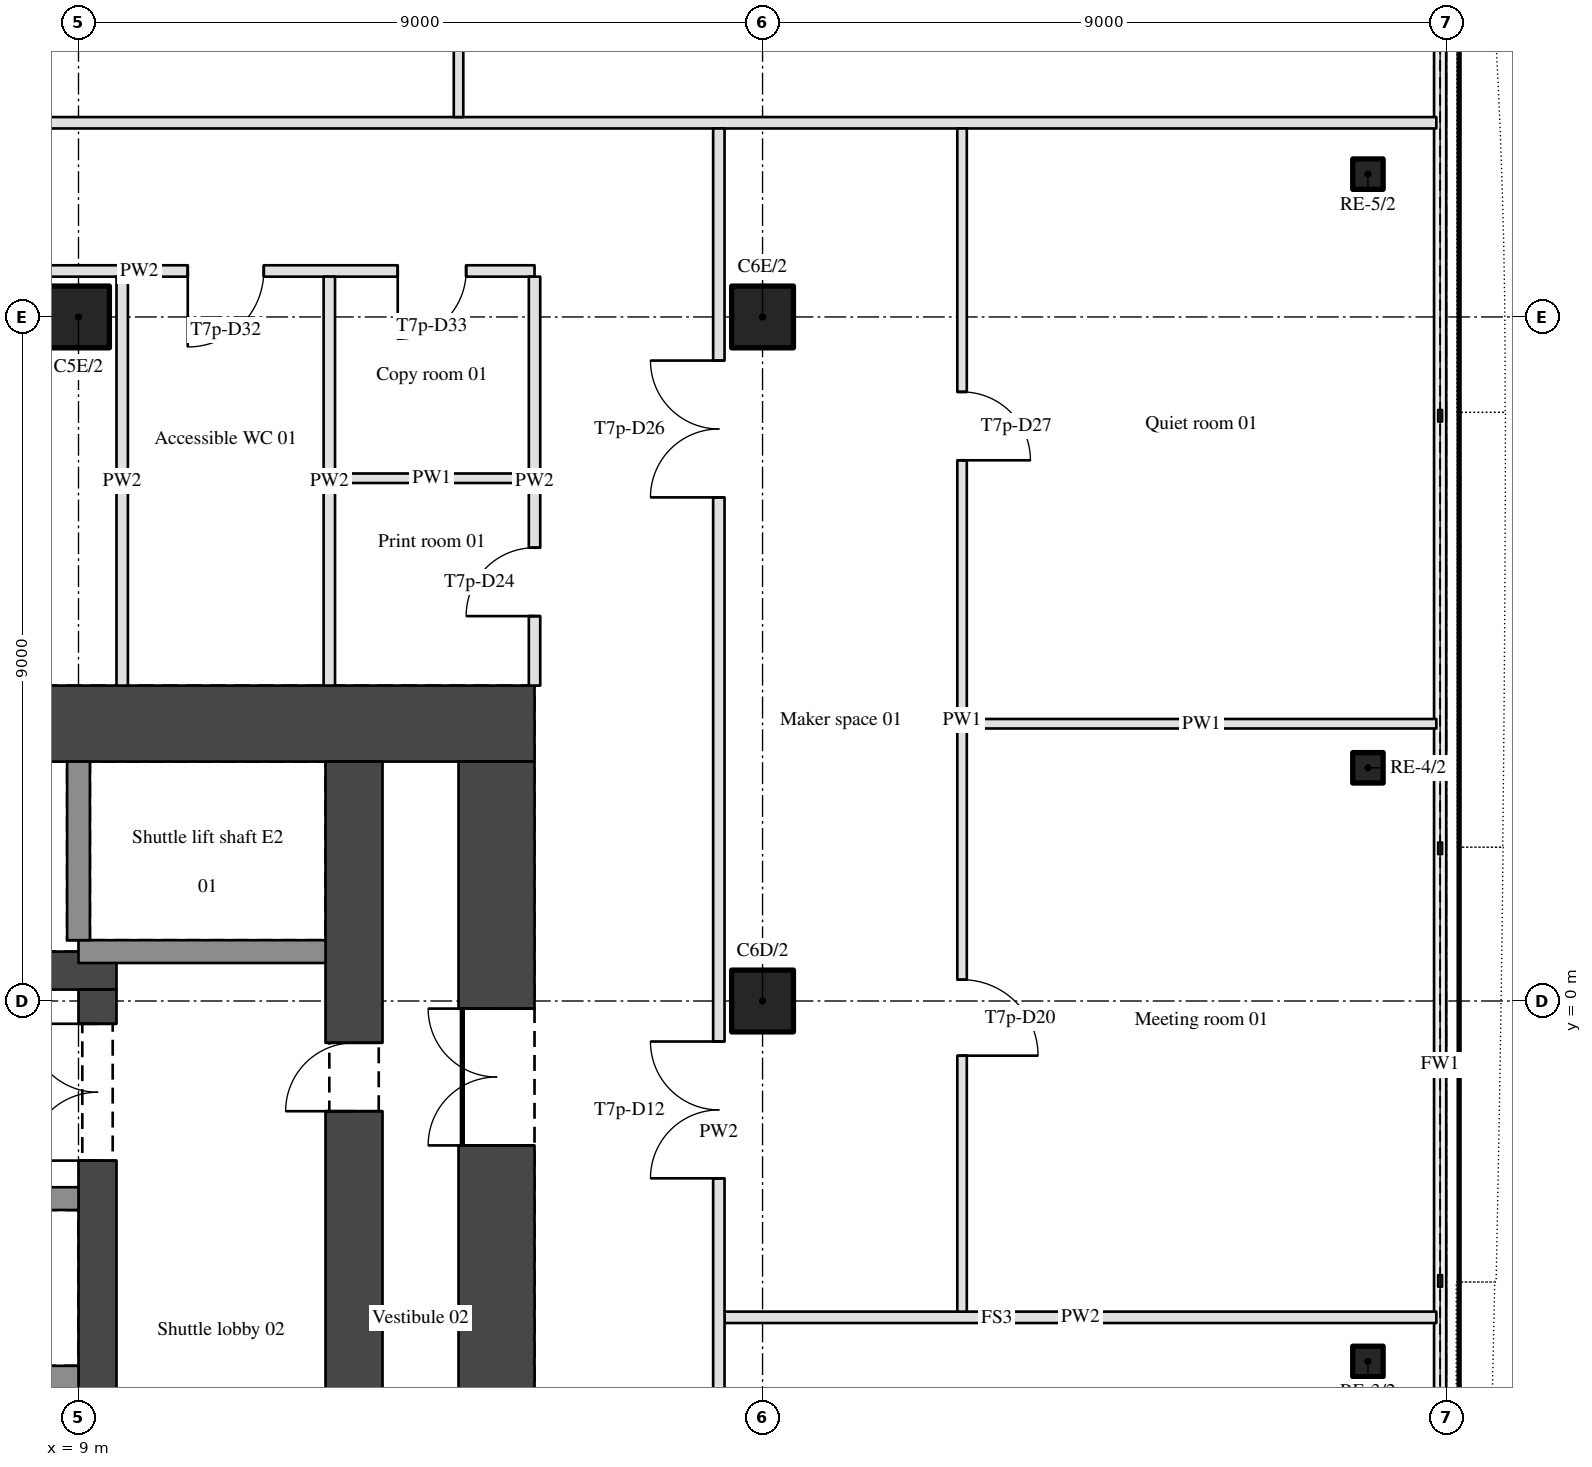
"""IFC4 building model, lengths in metres.
Left out: names, types, materials, properties, quantities, classifications, styles, units other than length and angle.
Written with IfcOpenShell. Run it as: python <this file> out.ifc"""

import sys

from ifc_helpers import new_model, si_unit, direction, frame, frame_2d, origin, origin_2d, place, context, subcontext, project, spatial, rectangle, hollow_rectangle, hollow_circle, extrude, element, fill, save


model = new_model("IFC4")
c1 = context("Model", 3, precision=1e-05, world=origin(), true_north=direction((0.0, 1.0)))
c2 = subcontext(c1, "Body", "Model", "MODEL_VIEW")
j1 = project(units=[si_unit("LENGTHUNIT", "METRE"), si_unit("PLANEANGLEUNIT", "RADIAN")], contexts=[c1])
p1 = place(None, origin())
s1 = spatial("IfcSite", under=j1, at=p1, CompositionType="ELEMENT")
p2 = place(p1, origin())
s2 = spatial("IfcBuilding", under=s1, at=p2, CompositionType="ELEMENT")
p3 = place(p2, frame((0.0, 0.0, 105.0)))
s3 = spatial("IfcBuildingStorey", under=s2, at=p3, CompositionType="ELEMENT", Elevation=105.0)
for number, where, z_axis, x_axis in (
    (1, (9.0, 9.0, 0.0), (0.0, 0.0, 1.0), (1.0, 0.0, 0.0)),
    (2, (18.0, 0.0, 0.0), (0.0, 0.0, 1.0), (1.0, 0.0, 0.0)),
    (3, (18.0, 9.0, 0.0), (0.0, 0.0, 1.0), (1.0, 0.0, 0.0)),
):
    element("IfcColumn", number, at=place(p3, frame(where, z_axis=z_axis, x_axis=x_axis)), inside=s3, PredefinedType="COLUMN", context=c2, shape_type="SweptSolid", body=[
        extrude(hollow_circle(Radius=0.406, WallThickness=0.036, at=origin_2d()), origin(), (0.0, 0.0, 1.0), 3.9),
    ])
for number, where, z_axis, x_axis in (
    (4, (25.965, -4.742, 0.0), (0.0, 0.0, 1.0), (1.0, 0.0, 0.0)),
    (5, (25.965, 3.068, 0.0), (0.0, 0.0, 1.0), (1.0, 0.0, 0.0)),
    (6, (25.965, 10.879, 0.0), (0.0, 0.0, 1.0), (1.0, 0.0, 0.0)),
):
    element("IfcColumn", number, at=place(p3, frame(where, z_axis=z_axis, x_axis=x_axis)), inside=s3, PredefinedType="COLUMN", context=c2, shape_type="SweptSolid", body=[
        extrude(hollow_rectangle(XDim=0.4, YDim=0.4, WallThickness=0.025, InnerFilletRadius=0.038, OuterFilletRadius=0.062, at=origin_2d()), origin(), (0.0, 0.0, 1.0), 3.9),
    ])
p4 = place(p3, frame((-15.0, 3.65, 0.0), z_axis=(0.0, 0.0, 1.0), x_axis=(1.0, 0.0, 0.0)))
e7 = element("IfcWall", 7, at=p4, inside=s3, PredefinedType="SHEAR", context=c2, shape_type="SweptSolid", body=[
    extrude(rectangle(XDim=30.0, YDim=1.0, at=frame_2d((15.0, 0.0))), origin(), (0.0, 0.0, 1.0), 3.9),
])
p5 = place(p3, frame((14.5, -11.5, 0.0), z_axis=(0.0, 0.0, 1.0), x_axis=(0.0, 1.0, 0.0)))
e8 = element("IfcWall", 8, at=p5, inside=s3, PredefinedType="SHEAR", context=c2, shape_type="SweptSolid", body=[
    extrude(rectangle(XDim=14.65, YDim=1.0, at=frame_2d((7.325, 0.0))), origin(), (0.0, 0.0, 1.0), 3.9),
])
p6 = place(p5, frame((9.6, 0.0, 0.0)))
e9 = element("IfcOpeningElement", 9, at=p6, cuts=e8, PredefinedType="OPENING", context=c2, shape_type="SweptSolid", body=[
    extrude(rectangle(XDim=1.8, YDim=2.1, at=frame_2d((0.9, 1.05))), frame((0.0, 0.51, 0.0), z_axis=(0.0, -1.0, 0.0), x_axis=(1.0, 0.0, 0.0)), (0.0, 0.0, 1.0), 1.02),
])
p7 = place(p3, frame((12.625, -11.5, 0.0), z_axis=(0.0, 0.0, 1.0), x_axis=(0.0, 1.0, 0.0)))
e10 = element("IfcWall", 10, at=p7, inside=s3, PredefinedType="SHEAR", context=c2, shape_type="SweptSolid", body=[
    extrude(rectangle(XDim=14.65, YDim=0.75, at=frame_2d((7.325, 0.0))), origin(), (0.0, 0.0, 1.0), 3.9),
])
p8 = place(p7, frame((10.05, 0.0, 0.0)))
e11 = element("IfcOpeningElement", 11, at=p8, cuts=e10, PredefinedType="OPENING", context=c2, shape_type="SweptSolid", body=[
    extrude(rectangle(XDim=0.9, YDim=2.1, at=frame_2d((0.45, 1.05))), frame((0.0, 0.385, 0.0), z_axis=(0.0, -1.0, 0.0), x_axis=(1.0, 0.0, 0.0)), (0.0, 0.0, 1.0), 0.77),
])
p9 = place(p3, frame((-9.5, 0.4, 0.0), z_axis=(0.0, 0.0, 1.0), x_axis=(1.0, 0.0, 0.0)))
e12 = element("IfcWall", 12, at=p9, inside=s3, PredefinedType="SHEAR", context=c2, shape_type="SweptSolid", body=[
    extrude(rectangle(XDim=19.0, YDim=0.5, at=frame_2d((9.5, 0.0))), origin(), (0.0, 0.0, 1.0), 3.9),
])
p10 = place(p3, frame((9.25, -11.5, 0.0), z_axis=(0.0, 0.0, 1.0), x_axis=(0.0, 1.0, 0.0)))
e13 = element("IfcWall", 13, at=p10, inside=s3, PredefinedType="SHEAR", context=c2, shape_type="SweptSolid", body=[
    extrude(rectangle(XDim=11.65, YDim=0.5, at=frame_2d((5.825, 0.0))), origin(), (0.0, 0.0, 1.0), 3.9),
])
p11 = place(p10, frame((9.4, 0.0, 0.0)))
e14 = element("IfcOpeningElement", 14, at=p11, cuts=e13, PredefinedType="OPENING", context=c2, shape_type="SweptSolid", body=[
    extrude(rectangle(XDim=1.8, YDim=2.1, at=frame_2d((0.9, 1.05))), frame((0.0, 0.26, 0.0), z_axis=(0.0, -1.0, 0.0), x_axis=(1.0, 0.0, 0.0)), (0.0, 0.0, 1.0), 0.52),
])
p12 = place(p10, frame((5.25, 0.0, 0.0)))
e15 = element("IfcOpeningElement", 15, at=p12, cuts=e13, PredefinedType="OPENING", context=c2, shape_type="SweptSolid", body=[
    extrude(rectangle(XDim=1.1, YDim=2.1, at=frame_2d((0.55, 1.05))), frame((0.0, 0.26, 0.0), z_axis=(0.0, -1.0, 0.0), x_axis=(1.0, 0.0, 0.0)), (0.0, 0.0, 1.0), 0.52),
])
p13 = place(p3, frame((0.9, -4.95, 0.0), z_axis=(0.0, 0.0, 1.0), x_axis=(1.0, 0.0, 0.0)))
e16 = element("IfcWall", 16, at=p13, inside=s3, PredefinedType="SHEAR", context=c2, shape_type="SweptSolid", body=[
    extrude(rectangle(XDim=8.1, YDim=0.3, at=frame_2d((4.05, 0.0))), origin(), (0.0, 0.0, 1.0), 3.9),
])
p14 = place(p3, frame((17.5, -4.162, 0.0), z_axis=(0.0, 0.0, 1.0), x_axis=(1.0, 0.0, 0.0)))
e17 = element("IfcWall", 17, at=p14, inside=s3, PredefinedType="PARTITIONING", context=c2, shape_type="SweptSolid", body=[
    extrude(rectangle(XDim=9.365, YDim=0.15, at=frame_2d((4.683, 0.0))), origin(), (0.0, 0.0, 1.0), 2.96),
])
p15 = place(p3, frame((0.9, -2.6, 0.0), z_axis=(0.0, 0.0, 1.0), x_axis=(1.0, 0.0, 0.0)))
e18 = element("IfcWall", 18, at=p15, inside=s3, PredefinedType="SHEAR", context=c2, shape_type="SweptSolid", body=[
    extrude(rectangle(XDim=8.1, YDim=0.3, at=frame_2d((4.05, 0.0))), origin(), (0.0, 0.0, 1.0), 3.9),
])
p16 = place(p15, frame((0.8, 0.0, 0.0)))
e19 = element("IfcOpeningElement", 19, at=p16, cuts=e18, PredefinedType="OPENING", context=c2, shape_type="SweptSolid", body=[
    extrude(rectangle(XDim=1.1, YDim=2.1, at=frame_2d((0.55, 1.05))), frame((0.0, 0.16, 0.0), z_axis=(0.0, -1.0, 0.0), x_axis=(1.0, 0.0, 0.0)), (0.0, 0.0, 1.0), 0.32),
])
p17 = place(p15, frame((3.5, 0.0, 0.0)))
e20 = element("IfcOpeningElement", 20, at=p17, cuts=e18, PredefinedType="OPENING", context=c2, shape_type="SweptSolid", body=[
    extrude(rectangle(XDim=1.1, YDim=2.1, at=frame_2d((0.55, 1.05))), frame((0.0, 0.16, 0.0), z_axis=(0.0, -1.0, 0.0), x_axis=(1.0, 0.0, 0.0)), (0.0, 0.0, 1.0), 0.32),
])
p18 = place(p15, frame((6.2, 0.0, 0.0)))
e21 = element("IfcOpeningElement", 21, at=p18, cuts=e18, PredefinedType="OPENING", context=c2, shape_type="SweptSolid", body=[
    extrude(rectangle(XDim=1.1, YDim=2.1, at=frame_2d((0.55, 1.05))), frame((0.0, 0.16, 0.0), z_axis=(0.0, -1.0, 0.0), x_axis=(1.0, 0.0, 0.0)), (0.0, 0.0, 1.0), 0.32),
])
p19 = place(p3, frame((12.25, 0.65, 0.0), z_axis=(0.0, 0.0, 1.0), x_axis=(-1.0, 0.0, 0.0)))
e22 = element("IfcWall", 22, at=p19, inside=s3, PredefinedType="SHEAR", context=c2, shape_type="SweptSolid", body=[
    extrude(rectangle(XDim=3.25, YDim=0.3, at=frame_2d((1.625, 0.0))), origin(), (0.0, 0.0, 1.0), 3.9),
])
p20 = place(p3, frame((20.688, 3.648, 0.0), z_axis=(0.0, 0.0, 1.0), x_axis=(1.0, 0.0, 0.0)))
e23 = element("IfcWall", 23, at=p20, inside=s3, PredefinedType="PARTITIONING", context=c2, shape_type="SweptSolid", body=[
    extrude(rectangle(XDim=6.177, YDim=0.125, at=frame_2d((3.089, 0.0))), origin(), (0.0, 0.0, 1.0), 2.96),
])
p21 = place(p3, frame((12.375, 6.878, 0.0), z_axis=(0.0, 0.0, 1.0), x_axis=(1.0, 0.0, 0.0)))
e24 = element("IfcWall", 24, at=p21, inside=s3, PredefinedType="PARTITIONING", context=c2, shape_type="SweptSolid", body=[
    extrude(rectangle(XDim=2.55, YDim=0.125, at=frame_2d((1.275, 0.0))), origin(), (0.0, 0.0, 1.0), 2.96),
])
p22 = place(p3, frame((15.0, 9.605, 0.0), z_axis=(0.0, 0.0, 1.0), x_axis=(-1.0, 0.0, 0.0)))
e25 = element("IfcWall", 25, at=p22, inside=s3, PredefinedType="PARTITIONING", context=c2, shape_type="SweptSolid", body=[
    extrude(rectangle(XDim=10.4, YDim=0.15, at=frame_2d((5.2, 0.0))), origin(), (0.0, 0.0, 1.0), 2.96),
])
p23 = place(p22, frame((0.9, 0.0, 0.0)))
e26 = element("IfcOpeningElement", 26, at=p23, cuts=e25, PredefinedType="OPENING", context=c2, shape_type="SweptSolid", body=[
    extrude(rectangle(XDim=0.9, YDim=2.1, at=frame_2d((0.45, 1.05))), frame((0.0, 0.085, 0.0), z_axis=(0.0, -1.0, 0.0), x_axis=(1.0, 0.0, 0.0)), (0.0, 0.0, 1.0), 0.17),
])
p24 = place(p22, frame((7.462, 0.0, 0.0)))
e27 = element("IfcOpeningElement", 27, at=p24, cuts=e25, PredefinedType="OPENING", context=c2, shape_type="SweptSolid", body=[
    extrude(rectangle(XDim=0.9, YDim=2.1, at=frame_2d((0.45, 1.05))), frame((0.0, 0.085, 0.0), z_axis=(0.0, -1.0, 0.0), x_axis=(1.0, 0.0, 0.0)), (0.0, 0.0, 1.0), 0.17),
])
p25 = place(p22, frame((3.562, 0.0, 0.0)))
e28 = element("IfcOpeningElement", 28, at=p25, cuts=e25, PredefinedType="OPENING", context=c2, shape_type="SweptSolid", body=[
    extrude(rectangle(XDim=1.0, YDim=2.1, at=frame_2d((0.5, 1.05))), frame((0.0, 0.085, 0.0), z_axis=(0.0, -1.0, 0.0), x_axis=(1.0, 0.0, 0.0)), (0.0, 0.0, 1.0), 0.17),
])
p26 = place(p3, frame((26.865, 11.555, 0.0), z_axis=(0.0, 0.0, 1.0), x_axis=(-1.0, 0.0, 0.0)))
e29 = element("IfcWall", 29, at=p26, inside=s3, PredefinedType="PARTITIONING", context=c2, shape_type="SweptSolid", body=[
    extrude(rectangle(XDim=47.73, YDim=0.15, at=frame_2d((23.865, 0.0))), origin(), (0.0, 0.0, 1.0), 2.96),
])
p27 = place(p26, frame((41.015, 0.0, 0.0)))
e30 = element("IfcOpeningElement", 30, at=p27, cuts=e29, PredefinedType="OPENING", context=c2, shape_type="SweptSolid", body=[
    extrude(rectangle(XDim=1.8, YDim=2.1, at=frame_2d((0.9, 1.05))), frame((0.0, 0.085, 0.0), z_axis=(0.0, -1.0, 0.0), x_axis=(1.0, 0.0, 0.0)), (0.0, 0.0, 1.0), 0.17),
])
p28 = place(p26, frame((21.015, 0.0, 0.0)))
e31 = element("IfcOpeningElement", 31, at=p28, cuts=e29, PredefinedType="OPENING", context=c2, shape_type="SweptSolid", body=[
    extrude(rectangle(XDim=1.8, YDim=2.1, at=frame_2d((0.9, 1.05))), frame((0.0, 0.085, 0.0), z_axis=(0.0, -1.0, 0.0), x_axis=(1.0, 0.0, 0.0)), (0.0, 0.0, 1.0), 0.17),
])
p29 = place(p3, frame((9.0, 0.8, 0.0), z_axis=(0.0, 0.0, 1.0), x_axis=(0.0, 1.0, 0.0)))
e32 = element("IfcWall", 32, at=p29, inside=s3, PredefinedType="SHEAR", context=c2, shape_type="SweptSolid", body=[
    extrude(rectangle(XDim=2.35, YDim=0.3, at=frame_2d((1.175, 0.0))), origin(), (0.0, 0.0, 1.0), 3.9),
])
for number, where, z_axis, x_axis in (
    (33, (9.575, 4.15, 0.0), (0.0, 0.0, 1.0), (0.0, 1.0, 0.0)),
    (34, (12.3, 4.15, 0.0), (0.0, 0.0, 1.0), (0.0, 1.0, 0.0)),
):
    element("IfcWall", number, at=place(p3, frame(where, z_axis=z_axis, x_axis=x_axis)), inside=s3, PredefinedType="PARTITIONING", context=c2, shape_type="SweptSolid", body=[
        extrude(rectangle(XDim=5.38, YDim=0.15, at=frame_2d((2.69, 0.0))), origin(), (0.0, 0.0, 1.0), 2.96),
    ])
p30 = place(p3, frame((14.0, 11.63, 0.0), z_axis=(0.0, 0.0, 1.0), x_axis=(0.0, 1.0, 0.0)))
e35 = element("IfcWall", 35, at=p30, inside=s3, PredefinedType="PARTITIONING", context=c2, shape_type="SweptSolid", body=[
    extrude(rectangle(XDim=4.263, YDim=0.125, at=frame_2d((2.131, 0.0))), origin(), (0.0, 0.0, 1.0), 2.96),
])
p31 = place(p3, frame((15.0, 4.15, 0.0), z_axis=(0.0, 0.0, 1.0), x_axis=(0.0, 1.0, 0.0)))
e36 = element("IfcWall", 36, at=p31, inside=s3, PredefinedType="PARTITIONING", context=c2, shape_type="SweptSolid", body=[
    extrude(rectangle(XDim=5.38, YDim=0.15, at=frame_2d((2.69, 0.0))), origin(), (0.0, 0.0, 1.0), 2.96),
])
p32 = place(p31, frame((0.914, 0.0, 0.0)))
e37 = element("IfcOpeningElement", 37, at=p32, cuts=e36, PredefinedType="OPENING", context=c2, shape_type="SweptSolid", body=[
    extrude(rectangle(XDim=0.9, YDim=2.1, at=frame_2d((0.45, 1.05))), frame((0.0, 0.085, 0.0), z_axis=(0.0, -1.0, 0.0), x_axis=(1.0, 0.0, 0.0)), (0.0, 0.0, 1.0), 0.17),
])
p33 = place(p3, frame((17.425, -14.925, 0.0), z_axis=(0.0, 0.0, 1.0), x_axis=(0.0, 1.0, 0.0)))
e38 = element("IfcWall", 38, at=p33, inside=s3, PredefinedType="PARTITIONING", context=c2, shape_type="SweptSolid", body=[
    extrude(rectangle(XDim=26.405, YDim=0.15, at=frame_2d((13.203, 0.0))), origin(), (0.0, 0.0, 1.0), 2.96),
])
p34 = place(p33, frame((0.312, 0.0, 0.0)))
e39 = element("IfcOpeningElement", 39, at=p34, cuts=e38, PredefinedType="OPENING", context=c2, shape_type="SweptSolid", body=[
    extrude(rectangle(XDim=1.8, YDim=2.1, at=frame_2d((0.9, 1.05))), frame((0.0, 0.085, 0.0), z_axis=(0.0, -1.0, 0.0), x_axis=(1.0, 0.0, 0.0)), (0.0, 0.0, 1.0), 0.17),
])
p35 = place(p33, frame((12.592, 0.0, 0.0)))
e40 = element("IfcOpeningElement", 40, at=p35, cuts=e38, PredefinedType="OPENING", context=c2, shape_type="SweptSolid", body=[
    extrude(rectangle(XDim=1.8, YDim=2.1, at=frame_2d((0.9, 1.05))), frame((0.0, 0.085, 0.0), z_axis=(0.0, -1.0, 0.0), x_axis=(1.0, 0.0, 0.0)), (0.0, 0.0, 1.0), 0.17),
])
p36 = place(p33, frame((21.551, 0.0, 0.0)))
e41 = element("IfcOpeningElement", 41, at=p36, cuts=e38, PredefinedType="OPENING", context=c2, shape_type="SweptSolid", body=[
    extrude(rectangle(XDim=1.8, YDim=2.1, at=frame_2d((0.9, 1.05))), frame((0.0, 0.085, 0.0), z_axis=(0.0, -1.0, 0.0), x_axis=(1.0, 0.0, 0.0)), (0.0, 0.0, 1.0), 0.17),
])
p37 = place(p3, frame((20.625, 11.48, 0.0), z_axis=(0.0, 0.0, 1.0), x_axis=(0.0, -1.0, 0.0)))
e42 = element("IfcWall", 42, at=p37, inside=s3, PredefinedType="PARTITIONING", context=c2, shape_type="SweptSolid", body=[
    extrude(rectangle(XDim=15.567, YDim=0.125, at=frame_2d((7.783, 0.0))), origin(), (0.0, 0.0, 1.0), 2.96),
])
p38 = place(p37, frame((11.199, 0.0, 0.0)))
e43 = element("IfcOpeningElement", 43, at=p38, cuts=e42, PredefinedType="OPENING", context=c2, shape_type="SweptSolid", body=[
    extrude(rectangle(XDim=1.0, YDim=2.1, at=frame_2d((0.5, 1.05))), frame((0.0, 0.073, 0.0), z_axis=(0.0, -1.0, 0.0), x_axis=(1.0, 0.0, 0.0)), (0.0, 0.0, 1.0), 0.145),
])
p39 = place(p37, frame((3.466, 0.0, 0.0)))
e44 = element("IfcOpeningElement", 44, at=p39, cuts=e42, PredefinedType="OPENING", context=c2, shape_type="SweptSolid", body=[
    extrude(rectangle(XDim=0.9, YDim=2.1, at=frame_2d((0.45, 1.05))), frame((0.0, 0.073, 0.0), z_axis=(0.0, -1.0, 0.0), x_axis=(1.0, 0.0, 0.0)), (0.0, 0.0, 1.0), 0.145),
])
p40 = place(p35, origin())
e45 = element("IfcDoor", 45, at=p40, inside=s3, OperationType="DOUBLE_DOOR_SINGLE_SWING", PredefinedType="DOOR", context=c2, shape_type="SweptSolid", body=[
    extrude(rectangle(XDim=1.8, YDim=2.1, at=frame_2d((0.9, 1.05))), frame((0.0, 0.025, 0.0), z_axis=(0.0, -1.0, 0.0), x_axis=(1.0, 0.0, 0.0)), (0.0, 0.0, 1.0), 0.05),
])
fill(e40, e45)
p41 = place(p36, origin())
e46 = element("IfcDoor", 46, at=p41, inside=s3, OperationType="DOUBLE_DOOR_SINGLE_SWING", PredefinedType="DOOR", context=c2, shape_type="SweptSolid", body=[
    extrude(rectangle(XDim=1.8, YDim=2.1, at=frame_2d((0.9, 1.05))), frame((0.0, 0.025, 0.0), z_axis=(0.0, -1.0, 0.0), x_axis=(1.0, 0.0, 0.0)), (0.0, 0.0, 1.0), 0.05),
])
fill(e41, e46)
p42 = place(p6, origin())
e47 = element("IfcDoor", 47, at=p42, inside=s3, OperationType="DOUBLE_DOOR_SINGLE_SWING", PredefinedType="DOOR", context=c2, shape_type="SweptSolid", body=[
    extrude(rectangle(XDim=1.8, YDim=2.1, at=frame_2d((0.9, 1.05))), frame((0.0, 0.025, 0.0), z_axis=(0.0, -1.0, 0.0), x_axis=(1.0, 0.0, 0.0)), (0.0, 0.0, 1.0), 0.05),
])
fill(e9, e47)
p43 = place(p11, origin())
e48 = element("IfcDoor", 48, at=p43, inside=s3, OperationType="DOUBLE_DOOR_SINGLE_SWING", PredefinedType="DOOR", context=c2, shape_type="SweptSolid", body=[
    extrude(rectangle(XDim=1.8, YDim=2.1, at=frame_2d((0.9, 1.05))), frame((0.0, 0.025, 0.0), z_axis=(0.0, -1.0, 0.0), x_axis=(1.0, 0.0, 0.0)), (0.0, 0.0, 1.0), 0.05),
])
fill(e14, e48)
p44 = place(p32, origin())
e49 = element("IfcDoor", 49, at=p44, inside=s3, OperationType="SINGLE_SWING_LEFT", PredefinedType="DOOR", context=c2, shape_type="SweptSolid", body=[
    extrude(rectangle(XDim=0.9, YDim=2.1, at=frame_2d((0.45, 1.05))), frame((0.0, 0.025, 0.0), z_axis=(0.0, -1.0, 0.0), x_axis=(1.0, 0.0, 0.0)), (0.0, 0.0, 1.0), 0.05),
])
fill(e37, e49)
p45 = place(p23, origin())
e50 = element("IfcDoor", 50, at=p45, inside=s3, OperationType="SINGLE_SWING_RIGHT", PredefinedType="DOOR", context=c2, shape_type="SweptSolid", body=[
    extrude(rectangle(XDim=0.9, YDim=2.1, at=frame_2d((0.45, 1.05))), frame((0.0, 0.025, 0.0), z_axis=(0.0, -1.0, 0.0), x_axis=(1.0, 0.0, 0.0)), (0.0, 0.0, 1.0), 0.05),
])
fill(e26, e50)
p46 = place(p25, origin())
e51 = element("IfcDoor", 51, at=p46, inside=s3, OperationType="SINGLE_SWING_RIGHT", PredefinedType="DOOR", context=c2, shape_type="SweptSolid", body=[
    extrude(rectangle(XDim=1.0, YDim=2.1, at=frame_2d((0.5, 1.05))), frame((0.0, 0.025, 0.0), z_axis=(0.0, -1.0, 0.0), x_axis=(1.0, 0.0, 0.0)), (0.0, 0.0, 1.0), 0.05),
])
fill(e28, e51)
p47 = place(p38, origin())
e52 = element("IfcDoor", 52, at=p47, inside=s3, OperationType="SINGLE_SWING_RIGHT", PredefinedType="DOOR", context=c2, shape_type="SweptSolid", body=[
    extrude(rectangle(XDim=1.0, YDim=2.1, at=frame_2d((0.5, 1.05))), frame((0.0, 0.025, 0.0), z_axis=(0.0, -1.0, 0.0), x_axis=(1.0, 0.0, 0.0)), (0.0, 0.0, 1.0), 0.05),
])
fill(e43, e52)
p48 = place(p39, origin())
e53 = element("IfcDoor", 53, at=p48, inside=s3, OperationType="SINGLE_SWING_RIGHT", PredefinedType="DOOR", context=c2, shape_type="SweptSolid", body=[
    extrude(rectangle(XDim=0.9, YDim=2.1, at=frame_2d((0.45, 1.05))), frame((0.0, 0.025, 0.0), z_axis=(0.0, -1.0, 0.0), x_axis=(1.0, 0.0, 0.0)), (0.0, 0.0, 1.0), 0.05),
])
fill(e44, e53)
p49 = place(p8, origin())
e54 = element("IfcDoor", 54, at=p49, inside=s3, OperationType="SINGLE_SWING_LEFT", PredefinedType="DOOR", context=c2, shape_type="SweptSolid", body=[
    extrude(rectangle(XDim=0.9, YDim=2.1, at=frame_2d((0.45, 1.05))), frame((0.0, 0.025, 0.0), z_axis=(0.0, -1.0, 0.0), x_axis=(1.0, 0.0, 0.0)), (0.0, 0.0, 1.0), 0.05),
])
fill(e11, e54)
save(model, sys.argv[1])
